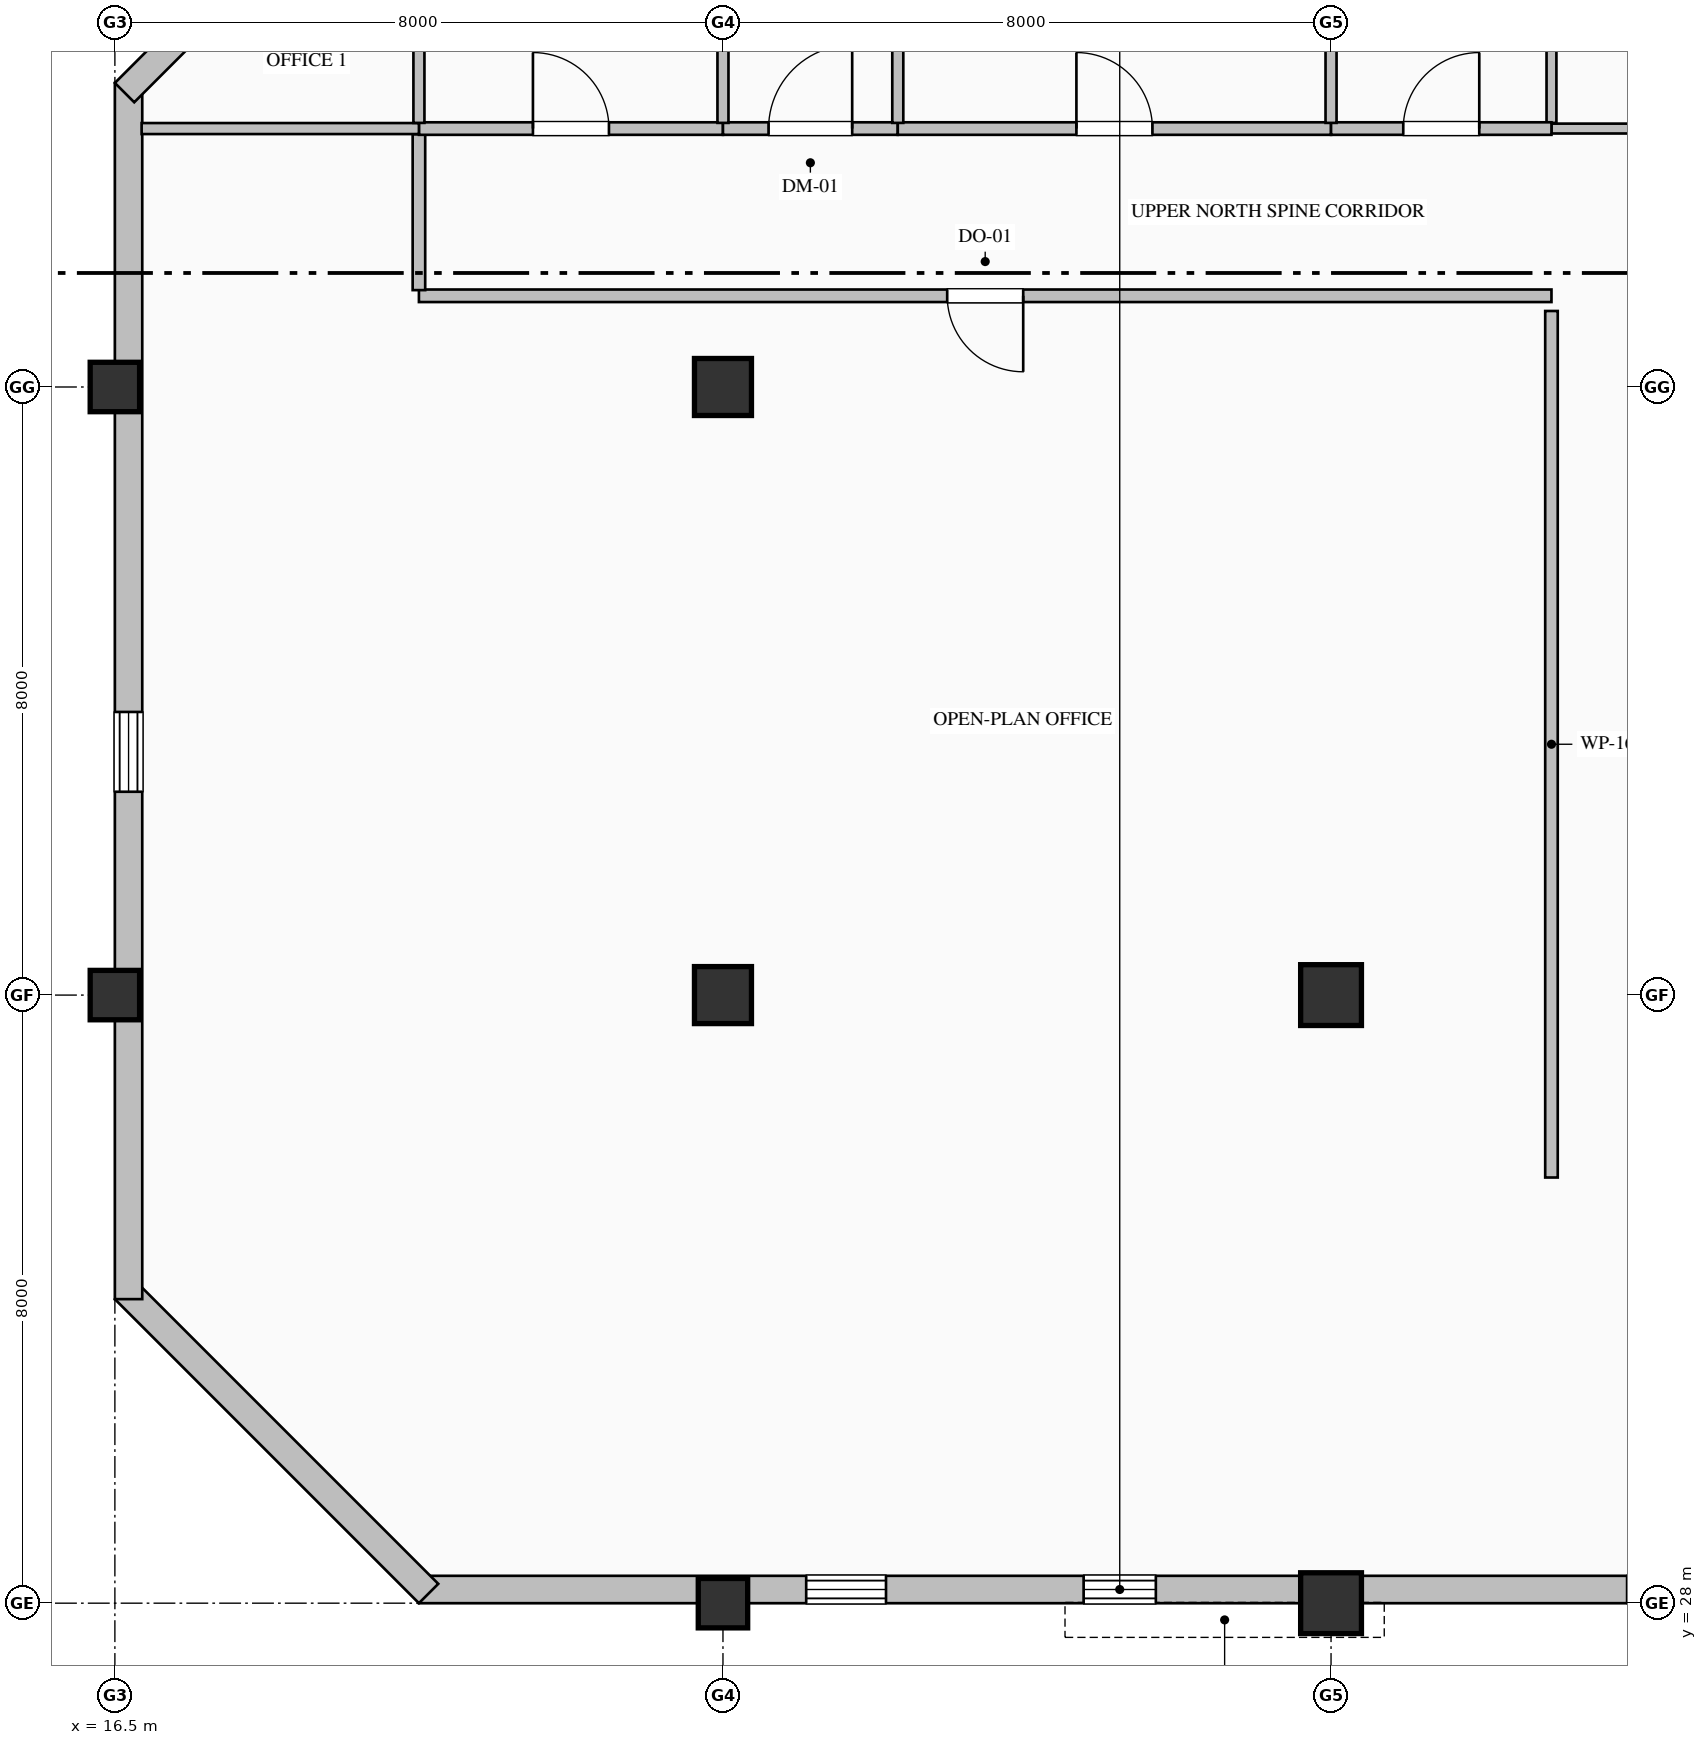
"""IFC4 building model, lengths in metres.
Left out: names, types, materials, properties, quantities, classifications, styles, units other than length and angle.
Written with IfcOpenShell. Run it as: python <this file> out.ifc"""

import sys

from ifc_helpers import new_model, si_unit, direction, frame, frame_2d, origin, origin_2d, place, context, subcontext, project, spatial, rectangle, hollow_rectangle, extrude, element, fill, save


model = new_model("IFC4")
c1 = context("Model", 3, precision=1e-05, world=origin(), true_north=direction((0.0, 1.0)))
c2 = subcontext(c1, "Body", "Model", "MODEL_VIEW")
j1 = project(units=[si_unit("LENGTHUNIT", "METRE"), si_unit("PLANEANGLEUNIT", "RADIAN")], contexts=[c1])
p1 = place(None, origin())
s1 = spatial("IfcSite", under=j1, at=p1, CompositionType="ELEMENT")
p2 = place(p1, origin())
s2 = spatial("IfcBuilding", under=s1, at=p2, CompositionType="ELEMENT")
p3 = place(p2, frame((0.0, 0.0, 299.2)))
s3 = spatial("IfcBuildingStorey", under=s2, at=p3, CompositionType="ELEMENT", Elevation=299.2)
for number, where, z_axis, x_axis in (
    (1, (16.5, 36.0, 0.0), (0.0, 0.0, 1.0), (1.0, 0.0, 0.0)),
    (2, (16.5, 44.0, 0.0), (0.0, 0.0, 1.0), (1.0, 0.0, 0.0)),
    (3, (24.5, 28.0, 0.0), (0.0, 0.0, 1.0), (1.0, 0.0, 0.0)),
):
    element("IfcColumn", number, at=place(p3, frame(where, z_axis=z_axis, x_axis=x_axis)), inside=s3, PredefinedType="COLUMN", context=c2, shape_type="SweptSolid", body=[
        extrude(hollow_rectangle(XDim=0.65, YDim=0.65, WallThickness=0.028, at=origin_2d()), origin(), (0.0, 0.0, 1.0), 4.0),
    ])
for number, where, z_axis, x_axis in (
    (4, (24.5, 36.0, 0.0), (0.0, 0.0, 1.0), (1.0, 0.0, 0.0)),
    (5, (24.5, 44.0, 0.0), (0.0, 0.0, 1.0), (1.0, 0.0, 0.0)),
):
    element("IfcColumn", number, at=place(p3, frame(where, z_axis=z_axis, x_axis=x_axis)), inside=s3, PredefinedType="COLUMN", context=c2, shape_type="SweptSolid", body=[
        extrude(rectangle(XDim=0.75, YDim=0.75, at=origin_2d()), origin(), (0.0, 0.0, 1.0), 4.0),
    ])
for number, where, z_axis, x_axis in (
    (6, (32.5, 28.0, 0.0), (0.0, 0.0, 1.0), (1.0, 0.0, 0.0)),
    (7, (32.5, 36.0, 0.0), (0.0, 0.0, 1.0), (1.0, 0.0, 0.0)),
):
    element("IfcColumn", number, at=place(p3, frame(where, z_axis=z_axis, x_axis=x_axis)), inside=s3, PredefinedType="COLUMN", context=c2, shape_type="SweptSolid", body=[
        extrude(hollow_rectangle(XDim=0.8, YDim=0.8, WallThickness=0.032, at=origin_2d()), origin(), (0.0, 0.0, 1.0), 4.0),
    ])
p4 = place(p3, frame((40.52, 28.18, 0.0), z_axis=(0.0, 0.0, 1.0), x_axis=(-1.0, 0.0, 0.0)))
e8 = element("IfcWall", 8, at=p4, inside=s3, PredefinedType="SOLIDWALL", context=c2, shape_type="SweptSolid", body=[
    extrude(rectangle(XDim=20.02, YDim=0.36, at=frame_2d((10.01, 0.0))), origin(), (0.0, 0.0, 1.0), 3.185),
])
p5 = place(p4, frame((3.075, 0.0, 0.8)))
e9 = element("IfcOpeningElement", 9, at=p5, cuts=e8, PredefinedType="OPENING", context=c2, shape_type="SweptSolid", body=[
    extrude(rectangle(XDim=1.05, YDim=2.15, at=frame_2d((0.525, 1.075))), frame((0.0, 0.19, 0.0), z_axis=(0.0, -1.0, 0.0), x_axis=(1.0, 0.0, 0.0)), (0.0, 0.0, 1.0), 0.38),
])
p6 = place(p4, frame((10.325, 0.0, 0.9)))
e10 = element("IfcOpeningElement", 10, at=p6, cuts=e8, PredefinedType="OPENING", context=c2, shape_type="SweptSolid", body=[
    extrude(rectangle(XDim=0.95, YDim=1.85, at=frame_2d((0.475, 0.925))), frame((0.0, 0.19, 0.0), z_axis=(0.0, -1.0, 0.0), x_axis=(1.0, 0.0, 0.0)), (0.0, 0.0, 1.0), 0.38),
])
p7 = place(p4, frame((13.875, 0.0, 0.8)))
e11 = element("IfcOpeningElement", 11, at=p7, cuts=e8, PredefinedType="OPENING", context=c2, shape_type="SweptSolid", body=[
    extrude(rectangle(XDim=1.05, YDim=2.15, at=frame_2d((0.525, 1.075))), frame((0.0, 0.19, 0.0), z_axis=(0.0, -1.0, 0.0), x_axis=(1.0, 0.0, 0.0)), (0.0, 0.0, 1.0), 0.38),
])
p8 = place(p3, frame((20.627, 28.127, 0.0), z_axis=(0.0, 0.0, 1.0), x_axis=(-0.707106781187, 0.707106781187, 0.0)))
e12 = element("IfcWall", 12, at=p8, inside=s3, PredefinedType="SOLIDWALL", context=c2, shape_type="SweptSolid", body=[
    extrude(rectangle(XDim=5.657, YDim=0.36, at=frame_2d((2.828, 0.0))), origin(), (0.0, 0.0, 1.0), 3.785),
])
p9 = place(p3, frame((16.68, 32.0, 0.0), z_axis=(0.0, 0.0, 1.0), x_axis=(0.0, 1.0, 0.0)))
e13 = element("IfcWall", 13, at=p9, inside=s3, PredefinedType="SOLIDWALL", context=c2, shape_type="SweptSolid", body=[
    extrude(rectangle(XDim=16.0, YDim=0.36, at=frame_2d((8.0, 0.0))), origin(), (0.0, 0.0, 1.0), 3.335),
])
p10 = place(p9, frame((6.675, 0.0, 0.8)))
e14 = element("IfcOpeningElement", 14, at=p10, cuts=e13, PredefinedType="OPENING", context=c2, shape_type="SweptSolid", body=[
    extrude(rectangle(XDim=1.05, YDim=2.15, at=frame_2d((0.525, 1.075))), frame((0.0, 0.19, 0.0), z_axis=(0.0, -1.0, 0.0), x_axis=(1.0, 0.0, 0.0)), (0.0, 0.0, 1.0), 0.38),
])
p11 = place(p3, frame((16.627, 47.873, 0.0), z_axis=(0.0, 0.0, 1.0), x_axis=(0.707106781187, 0.707106781187, 0.0)))
e15 = element("IfcWall", 15, at=p11, inside=s3, PredefinedType="SOLIDWALL", context=c2, shape_type="SweptSolid", body=[
    extrude(rectangle(XDim=5.657, YDim=0.36, at=frame_2d((2.828, 0.0))), origin(), (0.0, 0.0, 1.0), 3.785),
])
p12 = place(p3, frame((37.8, 47.4, 0.0), z_axis=(0.0, 0.0, 1.0), x_axis=(-1.0, 0.0, 0.0)))
e16 = element("IfcWall", 16, at=p12, inside=s3, PredefinedType="PARTITIONING", context=c2, shape_type="SweptSolid", body=[
    extrude(rectangle(XDim=2.4, YDim=0.13, at=frame_2d((1.2, 0.0))), origin(), (0.0, 0.0, 1.0), 3.785),
])
p13 = place(p3, frame((35.4, 47.475, 0.0), z_axis=(0.0, 0.0, 1.0), x_axis=(0.0, 1.0, 0.0)))
e17 = element("IfcWall", 17, at=p13, inside=s3, PredefinedType="PARTITIONING", context=c2, shape_type="SweptSolid", body=[
    extrude(rectangle(XDim=4.173, YDim=0.13, at=frame_2d((2.087, 0.0))), origin(), (0.0, 0.0, 1.0), 3.785),
])
p14 = place(p3, frame((35.4, 45.2, 0.0), z_axis=(0.0, 0.0, 1.0), x_axis=(-1.0, 0.0, 0.0)))
e18 = element("IfcWall", 18, at=p14, inside=s3, PredefinedType="PARTITIONING", context=c2, shape_type="SweptSolid", body=[
    extrude(rectangle(XDim=14.9, YDim=0.165, at=frame_2d((7.45, 0.0))), origin(), (0.0, 0.0, 1.0), 3.785),
])
p15 = place(p14, frame((6.95, 0.0, 0.0)))
e19 = element("IfcOpeningElement", 19, at=p15, cuts=e18, PredefinedType="OPENING", context=c2, shape_type="SweptSolid", body=[
    extrude(rectangle(XDim=1.0, YDim=2.15, at=frame_2d((0.5, 1.075))), frame((0.0, 0.093, 0.0), z_axis=(0.0, -1.0, 0.0), x_axis=(1.0, 0.0, 0.0)), (0.0, 0.0, 1.0), 0.185),
])
p16 = place(p3, frame((20.5, 45.274, 0.0), z_axis=(0.0, 0.0, 1.0), x_axis=(0.0, 1.0, 0.0)))
e20 = element("IfcWall", 20, at=p16, inside=s3, PredefinedType="PARTITIONING", context=c2, shape_type="SweptSolid", body=[
    extrude(rectangle(XDim=2.051, YDim=0.165, at=frame_2d((1.025, 0.0))), origin(), (0.0, 0.0, 1.0), 3.785),
])
p17 = place(p3, frame((20.5, 47.4, 0.0), z_axis=(0.0, 0.0, 1.0), x_axis=(1.0, 0.0, 0.0)))
e21 = element("IfcWall", 21, at=p17, inside=s3, PredefinedType="PARTITIONING", context=c2, shape_type="SweptSolid", body=[
    extrude(rectangle(XDim=4.0, YDim=0.165, at=frame_2d((2.0, 0.0))), origin(), (0.0, 0.0, 1.0), 3.785),
])
p18 = place(p17, frame((1.5, 0.0, 0.0)))
e22 = element("IfcOpeningElement", 22, at=p18, cuts=e21, PredefinedType="OPENING", context=c2, shape_type="SweptSolid", body=[
    extrude(rectangle(XDim=1.0, YDim=2.15, at=frame_2d((0.5, 1.075))), frame((0.0, 0.093, 0.0), z_axis=(0.0, -1.0, 0.0), x_axis=(1.0, 0.0, 0.0)), (0.0, 0.0, 1.0), 0.185),
])
p19 = place(p3, frame((24.5, 47.4, 0.0), z_axis=(0.0, 0.0, 1.0), x_axis=(1.0, 0.0, 0.0)))
e23 = element("IfcWall", 23, at=p19, inside=s3, PredefinedType="PARTITIONING", context=c2, shape_type="SweptSolid", body=[
    extrude(rectangle(XDim=2.3, YDim=0.165, at=frame_2d((1.15, 0.0))), origin(), (0.0, 0.0, 1.0), 3.785),
])
p20 = place(p19, frame((0.6, 0.0, 0.0)))
e24 = element("IfcOpeningElement", 24, at=p20, cuts=e23, PredefinedType="OPENING", context=c2, shape_type="SweptSolid", body=[
    extrude(rectangle(XDim=1.1, YDim=2.2, at=frame_2d((0.55, 1.1))), frame((0.0, 0.093, 0.0), z_axis=(0.0, -1.0, 0.0), x_axis=(1.0, 0.0, 0.0)), (0.0, 0.0, 1.0), 0.185),
])
p21 = place(p3, frame((26.8, 47.4, 0.0), z_axis=(0.0, 0.0, 1.0), x_axis=(1.0, 0.0, 0.0)))
e25 = element("IfcWall", 25, at=p21, inside=s3, PredefinedType="PARTITIONING", context=c2, shape_type="SweptSolid", body=[
    extrude(rectangle(XDim=5.7, YDim=0.165, at=frame_2d((2.85, 0.0))), origin(), (0.0, 0.0, 1.0), 3.785),
])
p22 = place(p21, frame((2.35, 0.0, 0.0)))
e26 = element("IfcOpeningElement", 26, at=p22, cuts=e25, PredefinedType="OPENING", context=c2, shape_type="SweptSolid", body=[
    extrude(rectangle(XDim=1.0, YDim=2.15, at=frame_2d((0.5, 1.075))), frame((0.0, 0.093, 0.0), z_axis=(0.0, -1.0, 0.0), x_axis=(1.0, 0.0, 0.0)), (0.0, 0.0, 1.0), 0.185),
])
p23 = place(p3, frame((32.5, 47.4, 0.0), z_axis=(0.0, 0.0, 1.0), x_axis=(1.0, 0.0, 0.0)))
e27 = element("IfcWall", 27, at=p23, inside=s3, PredefinedType="PARTITIONING", context=c2, shape_type="SweptSolid", body=[
    extrude(rectangle(XDim=2.9, YDim=0.165, at=frame_2d((1.45, 0.0))), origin(), (0.0, 0.0, 1.0), 3.785),
])
p24 = place(p23, frame((0.95, 0.0, 0.0)))
e28 = element("IfcOpeningElement", 28, at=p24, cuts=e27, PredefinedType="OPENING", context=c2, shape_type="SweptSolid", body=[
    extrude(rectangle(XDim=1.0, YDim=2.15, at=frame_2d((0.5, 1.075))), frame((0.0, 0.093, 0.0), z_axis=(0.0, -1.0, 0.0), x_axis=(1.0, 0.0, 0.0)), (0.0, 0.0, 1.0), 0.185),
])
p25 = place(p3, frame((35.4, 33.6, 0.0), z_axis=(0.0, 0.0, 1.0), x_axis=(0.0, 1.0, 0.0)))
e29 = element("IfcWall", 29, at=p25, inside=s3, PredefinedType="PARTITIONING", context=c2, shape_type="SweptSolid", body=[
    extrude(rectangle(XDim=11.4, YDim=0.165, at=frame_2d((5.7, 0.0))), origin(), (0.0, 0.0, 1.0), 3.785),
])
p26 = place(p3, frame((16.852, 47.4, 0.0), z_axis=(0.0, 0.0, 1.0), x_axis=(1.0, 0.0, 0.0)))
e30 = element("IfcWall", 30, at=p26, inside=s3, PredefinedType="PARTITIONING", context=c2, shape_type="SweptSolid", body=[
    extrude(rectangle(XDim=3.648, YDim=0.145, at=frame_2d((1.824, 0.0))), origin(), (0.0, 0.0, 1.0), 3.785),
])
p27 = place(p3, frame((20.5, 51.502, 0.0), z_axis=(0.0, 0.0, 1.0), x_axis=(0.0, -1.0, 0.0)))
e31 = element("IfcWall", 31, at=p27, inside=s3, PredefinedType="PARTITIONING", context=c2, shape_type="SweptSolid", body=[
    extrude(rectangle(XDim=4.028, YDim=0.145, at=frame_2d((2.014, 0.0))), origin(), (0.0, 0.0, 1.0), 3.785),
])
p28 = place(p27, frame((1.514, 0.0, 0.0)))
e32 = element("IfcOpeningElement", 32, at=p28, cuts=e31, PredefinedType="OPENING", context=c2, shape_type="SweptSolid", body=[
    extrude(rectangle(XDim=1.0, YDim=2.15, at=frame_2d((0.5, 1.075))), frame((0.0, 0.083, 0.0), z_axis=(0.0, -1.0, 0.0), x_axis=(1.0, 0.0, 0.0)), (0.0, 0.0, 1.0), 0.165),
])
p29 = place(p3, frame((24.5, 51.648, 0.0), z_axis=(0.0, 0.0, 1.0), x_axis=(0.0, -1.0, 0.0)))
e33 = element("IfcWall", 33, at=p29, inside=s3, PredefinedType="PARTITIONING", context=c2, shape_type="SweptSolid", body=[
    extrude(rectangle(XDim=4.173, YDim=0.145, at=frame_2d((2.087, 0.0))), origin(), (0.0, 0.0, 1.0), 3.177),
])
for number, where, z_axis, x_axis in (
    (34, (26.8, 51.648, 0.0), (0.0, 0.0, 1.0), (0.0, -1.0, 0.0)),
    (35, (32.5, 51.648, 0.0), (0.0, 0.0, 1.0), (0.0, -1.0, 0.0)),
):
    element("IfcWall", number, at=place(p3, frame(where, z_axis=z_axis, x_axis=x_axis)), inside=s3, PredefinedType="PARTITIONING", context=c2, shape_type="SweptSolid", body=[
        extrude(rectangle(XDim=4.173, YDim=0.145, at=frame_2d((2.087, 0.0))), origin(), (0.0, 0.0, 1.0), 3.785),
    ])
p30 = place(p5, origin())
e36 = element("IfcWindow", 36, at=p30, inside=s3, PartitioningType="SINGLE_PANEL", PredefinedType="WINDOW", context=c2, shape_type="SweptSolid", body=[
    extrude(rectangle(XDim=1.05, YDim=2.15, at=frame_2d((0.525, 1.075))), frame((0.0, 0.15, 0.0), z_axis=(0.0, -1.0, 0.0), x_axis=(1.0, 0.0, 0.0)), (0.0, 0.0, 1.0), 0.06),
])
fill(e9, e36)
p31 = place(p6, origin())
e37 = element("IfcWindow", 37, at=p31, inside=s3, PartitioningType="SINGLE_PANEL", PredefinedType="WINDOW", context=c2, shape_type="SweptSolid", body=[
    extrude(rectangle(XDim=0.95, YDim=1.85, at=frame_2d((0.475, 0.925))), frame((0.0, 0.15, 0.0), z_axis=(0.0, -1.0, 0.0), x_axis=(1.0, 0.0, 0.0)), (0.0, 0.0, 1.0), 0.06),
])
fill(e10, e37)
p32 = place(p7, origin())
e38 = element("IfcWindow", 38, at=p32, inside=s3, PartitioningType="SINGLE_PANEL", PredefinedType="WINDOW", context=c2, shape_type="SweptSolid", body=[
    extrude(rectangle(XDim=1.05, YDim=2.15, at=frame_2d((0.525, 1.075))), frame((0.0, 0.15, 0.0), z_axis=(0.0, -1.0, 0.0), x_axis=(1.0, 0.0, 0.0)), (0.0, 0.0, 1.0), 0.06),
])
fill(e11, e38)
p33 = place(p10, origin())
e39 = element("IfcWindow", 39, at=p33, inside=s3, PartitioningType="SINGLE_PANEL", PredefinedType="WINDOW", context=c2, shape_type="SweptSolid", body=[
    extrude(rectangle(XDim=1.05, YDim=2.15, at=frame_2d((0.525, 1.075))), frame((0.0, 0.15, 0.0), z_axis=(0.0, -1.0, 0.0), x_axis=(1.0, 0.0, 0.0)), (0.0, 0.0, 1.0), 0.06),
])
fill(e14, e39)
p34 = place(p15, origin())
e40 = element("IfcDoor", 40, at=p34, inside=s3, OperationType="SINGLE_SWING_LEFT", PredefinedType="DOOR", context=c2, shape_type="SweptSolid", body=[
    extrude(rectangle(XDim=1.0, YDim=2.15, at=frame_2d((0.5, 1.075))), frame((0.0, 0.025, 0.0), z_axis=(0.0, -1.0, 0.0), x_axis=(1.0, 0.0, 0.0)), (0.0, 0.0, 1.0), 0.05),
])
fill(e19, e40)
p35 = place(p18, origin())
e41 = element("IfcDoor", 41, at=p35, inside=s3, OperationType="SINGLE_SWING_LEFT", PredefinedType="DOOR", context=c2, shape_type="SweptSolid", body=[
    extrude(rectangle(XDim=1.0, YDim=2.15, at=frame_2d((0.5, 1.075))), frame((0.0, 0.025, 0.0), z_axis=(0.0, -1.0, 0.0), x_axis=(1.0, 0.0, 0.0)), (0.0, 0.0, 1.0), 0.05),
])
fill(e22, e41)
p36 = place(p20, origin())
e42 = element("IfcDoor", 42, at=p36, inside=s3, OperationType="SINGLE_SWING_RIGHT", PredefinedType="DOOR", context=c2, shape_type="SweptSolid", body=[
    extrude(rectangle(XDim=1.1, YDim=2.2, at=frame_2d((0.55, 1.1))), frame((0.0, 0.025, 0.0), z_axis=(0.0, -1.0, 0.0), x_axis=(1.0, 0.0, 0.0)), (0.0, 0.0, 1.0), 0.05),
])
fill(e24, e42)
p37 = place(p22, origin())
e43 = element("IfcDoor", 43, at=p37, inside=s3, OperationType="SINGLE_SWING_LEFT", PredefinedType="DOOR", context=c2, shape_type="SweptSolid", body=[
    extrude(rectangle(XDim=1.0, YDim=2.15, at=frame_2d((0.5, 1.075))), frame((0.0, 0.025, 0.0), z_axis=(0.0, -1.0, 0.0), x_axis=(1.0, 0.0, 0.0)), (0.0, 0.0, 1.0), 0.05),
])
fill(e26, e43)
p38 = place(p24, origin())
e44 = element("IfcDoor", 44, at=p38, inside=s3, OperationType="SINGLE_SWING_RIGHT", PredefinedType="DOOR", context=c2, shape_type="SweptSolid", body=[
    extrude(rectangle(XDim=1.0, YDim=2.15, at=frame_2d((0.5, 1.075))), frame((0.0, 0.025, 0.0), z_axis=(0.0, -1.0, 0.0), x_axis=(1.0, 0.0, 0.0)), (0.0, 0.0, 1.0), 0.05),
])
fill(e28, e44)
save(model, sys.argv[1])
